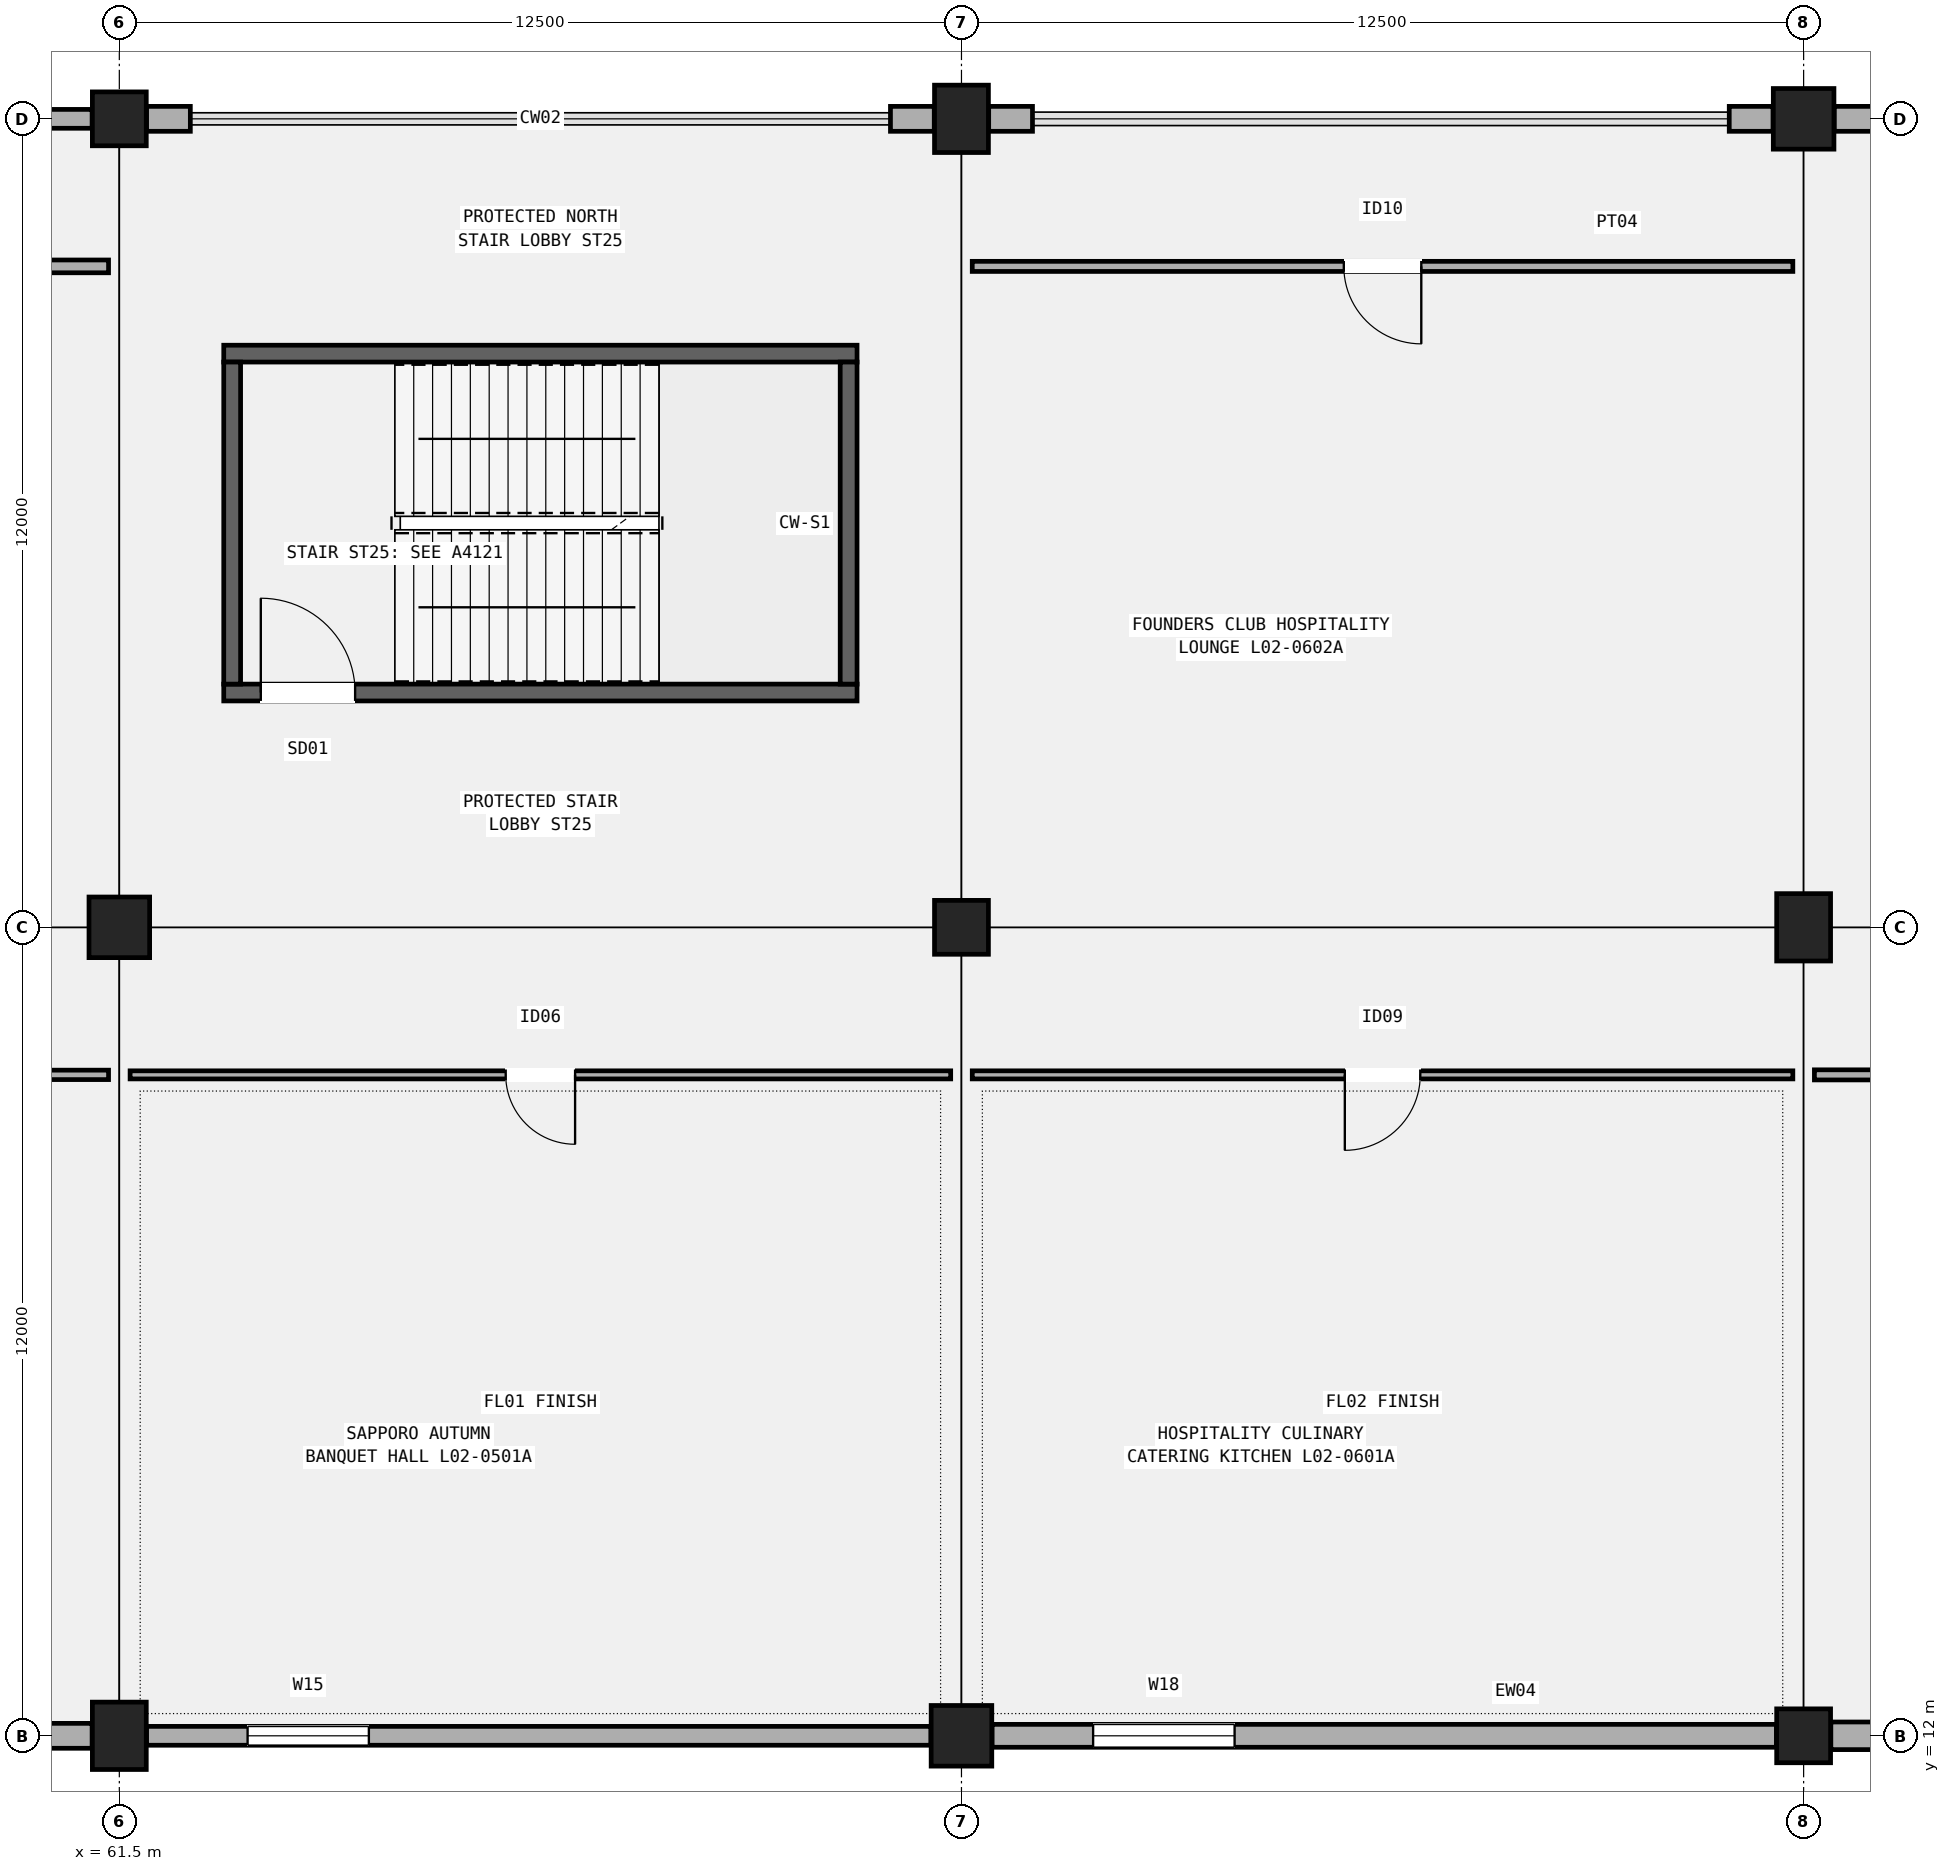
"""IFC4 building model, lengths in metres.
Left out: names, types, materials, properties, quantities, classifications, styles, units other than length and angle.
Written with IfcOpenShell. Run it as: python <this file> out.ifc"""

import sys

from ifc_helpers import new_model, si_unit, direction, frame, frame_2d, origin, origin_2d, place, context, subcontext, project, spatial, rectangle, extrude, element, fill, save


model = new_model("IFC4")
c1 = context("Model", 3, precision=1e-05, world=origin(), true_north=direction((0.0, 1.0)))
c2 = subcontext(c1, "Body", "Model", "MODEL_VIEW")
j1 = project(units=[si_unit("LENGTHUNIT", "METRE"), si_unit("PLANEANGLEUNIT", "RADIAN")], contexts=[c1])
p1 = place(None, origin())
s1 = spatial("IfcSite", under=j1, at=p1, CompositionType="ELEMENT")
p2 = place(p1, origin())
s2 = spatial("IfcBuilding", under=s1, at=p2, CompositionType="ELEMENT")
p3 = place(p2, frame((0.0, 0.0, 10.2)))
s3 = spatial("IfcBuildingStorey", under=s2, at=p3, CompositionType="ELEMENT", Elevation=10.2)
p4 = place(p3, frame((61.5, 12.0, 0.0), z_axis=(0.0, 0.0, 1.0), x_axis=(1.0, 0.0, 0.0)))
e1 = element("IfcColumn", 1, at=p4, inside=s3, PredefinedType="COLUMN", context=c2, shape_type="SweptSolid", body=[
    extrude(rectangle(XDim=0.8, YDim=1.0, at=origin_2d()), origin(), (0.0, 0.0, 1.0), 5.1),
])
p5 = place(p3, frame((61.5, 24.0, 0.0), z_axis=(0.0, 0.0, 1.0), x_axis=(1.0, 0.0, 0.0)))
e2 = element("IfcColumn", 2, at=p5, inside=s3, PredefinedType="COLUMN", context=c2, shape_type="SweptSolid", body=[
    extrude(rectangle(XDim=0.9, YDim=0.9, at=origin_2d()), origin(), (0.0, 0.0, 1.0), 5.1),
])
p6 = place(p3, frame((61.5, 36.0, 0.0), z_axis=(0.0, 0.0, 1.0), x_axis=(1.0, 0.0, 0.0)))
e3 = element("IfcColumn", 3, at=p6, inside=s3, PredefinedType="COLUMN", context=c2, shape_type="SweptSolid", body=[
    extrude(rectangle(XDim=0.8, YDim=0.8, at=origin_2d()), origin(), (0.0, 0.0, 1.0), 5.1),
])
p7 = place(p3, frame((74.0, 12.0, 0.0), z_axis=(0.0, 0.0, 1.0), x_axis=(1.0, 0.0, 0.0)))
e4 = element("IfcColumn", 4, at=p7, inside=s3, PredefinedType="COLUMN", context=c2, shape_type="SweptSolid", body=[
    extrude(rectangle(XDim=0.9, YDim=0.9, at=origin_2d()), origin(), (0.0, 0.0, 1.0), 5.1),
])
p8 = place(p3, frame((74.0, 24.0, 0.0), z_axis=(0.0, 0.0, 1.0), x_axis=(1.0, 0.0, 0.0)))
e5 = element("IfcColumn", 5, at=p8, inside=s3, PredefinedType="COLUMN", context=c2, shape_type="SweptSolid", body=[
    extrude(rectangle(XDim=0.8, YDim=0.8, at=origin_2d()), origin(), (0.0, 0.0, 1.0), 5.1),
])
p9 = place(p3, frame((74.0, 36.0, 0.0), z_axis=(0.0, 0.0, 1.0), x_axis=(1.0, 0.0, 0.0)))
e6 = element("IfcColumn", 6, at=p9, inside=s3, PredefinedType="COLUMN", context=c2, shape_type="SweptSolid", body=[
    extrude(rectangle(XDim=0.8, YDim=1.0, at=origin_2d()), origin(), (0.0, 0.0, 1.0), 5.1),
])
p10 = place(p3, frame((86.5, 12.0, 0.0), z_axis=(0.0, 0.0, 1.0), x_axis=(1.0, 0.0, 0.0)))
e7 = element("IfcColumn", 7, at=p10, inside=s3, PredefinedType="COLUMN", context=c2, shape_type="SweptSolid", body=[
    extrude(rectangle(XDim=0.8, YDim=0.8, at=origin_2d()), origin(), (0.0, 0.0, 1.0), 5.1),
])
p11 = place(p3, frame((86.5, 24.0, 0.0), z_axis=(0.0, 0.0, 1.0), x_axis=(1.0, 0.0, 0.0)))
e8 = element("IfcColumn", 8, at=p11, inside=s3, PredefinedType="COLUMN", context=c2, shape_type="SweptSolid", body=[
    extrude(rectangle(XDim=0.8, YDim=1.0, at=origin_2d()), origin(), (0.0, 0.0, 1.0), 5.1),
])
p12 = place(p3, frame((86.5, 36.0, 0.0), z_axis=(0.0, 0.0, 1.0), x_axis=(1.0, 0.0, 0.0)))
e9 = element("IfcColumn", 9, at=p12, inside=s3, PredefinedType="COLUMN", context=c2, shape_type="SweptSolid", body=[
    extrude(rectangle(XDim=0.9, YDim=0.9, at=origin_2d()), origin(), (0.0, 0.0, 1.0), 5.1),
])
p13 = place(p3, frame((60.446, 12.0, 0.0), z_axis=(0.0, 0.0, 1.0), x_axis=(1.0, 0.0, 0.0)))
e10 = element("IfcWall", 10, at=p13, inside=s3, PredefinedType="SOLIDWALL", context=c2, shape_type="SweptSolid", body=[
    extrude(rectangle(XDim=0.65, YDim=0.37, at=frame_2d((0.325, 0.0))), origin(), (0.0, 0.0, 1.0), 4.22),
])
p14 = place(p3, frame((49.454, 36.0, 0.0), z_axis=(0.0, 0.0, 1.0), x_axis=(1.0, 0.0, 0.0)))
e11 = element("IfcWall", 11, at=p14, inside=s3, PredefinedType="SOLIDWALL", context=c2, shape_type="SweptSolid", body=[
    extrude(rectangle(XDim=11.642, YDim=0.28, at=frame_2d((5.821, 0.0))), origin(), (0.0, 0.0, 1.0), 4.12),
])
p15 = place(p14, frame((1.5, 0.0, 0.95)))
e12 = element("IfcOpeningElement", 12, at=p15, cuts=e11, PredefinedType="OPENING", context=c2, shape_type="SweptSolid", body=[
    extrude(rectangle(XDim=1.65, YDim=2.45, at=frame_2d((0.825, 1.225))), frame((0.0, 0.15, 0.0), z_axis=(0.0, -1.0, 0.0), x_axis=(1.0, 0.0, 0.0)), (0.0, 0.0, 1.0), 0.3),
])
p16 = place(p3, frame((61.904, 12.0, 0.0), z_axis=(0.0, 0.0, 1.0), x_axis=(1.0, 0.0, 0.0)))
e13 = element("IfcWall", 13, at=p16, inside=s3, PredefinedType="SOLIDWALL", context=c2, shape_type="SweptSolid", body=[
    extrude(rectangle(XDim=11.642, YDim=0.28, at=frame_2d((5.821, 0.0))), origin(), (0.0, 0.0, 1.0), 4.02),
])
p17 = place(p16, frame((1.5, 0.0, 0.95)))
e14 = element("IfcOpeningElement", 14, at=p17, cuts=e13, PredefinedType="OPENING", context=c2, shape_type="SweptSolid", body=[
    extrude(rectangle(XDim=1.8, YDim=2.55, at=frame_2d((0.9, 1.275))), frame((0.0, 0.15, 0.0), z_axis=(0.0, -1.0, 0.0), x_axis=(1.0, 0.0, 0.0)), (0.0, 0.0, 1.0), 0.3),
])
for number, where, z_axis, x_axis in (
    (15, (61.904, 36.0, 0.0), (0.0, 0.0, 1.0), (1.0, 0.0, 0.0)),
    (16, (72.946, 36.0, 0.0), (0.0, 0.0, 1.0), (1.0, 0.0, 0.0)),
):
    element("IfcWall", number, at=place(p3, frame(where, z_axis=z_axis, x_axis=x_axis)), inside=s3, PredefinedType="SOLIDWALL", context=c2, shape_type="SweptSolid", body=[
        extrude(rectangle(XDim=0.65, YDim=0.37, at=frame_2d((0.325, 0.0))), origin(), (0.0, 0.0, 1.0), 4.22),
    ])
p18 = place(p3, frame((74.454, 12.0, 0.0), z_axis=(0.0, 0.0, 1.0), x_axis=(1.0, 0.0, 0.0)))
e17 = element("IfcWall", 17, at=p18, inside=s3, PredefinedType="SOLIDWALL", context=c2, shape_type="SweptSolid", body=[
    extrude(rectangle(XDim=11.642, YDim=0.34, at=frame_2d((5.821, 0.0))), origin(), (0.0, 0.0, 1.0), 4.12),
])
p19 = place(p18, frame((1.5, 0.0, 0.95)))
e18 = element("IfcOpeningElement", 18, at=p19, cuts=e17, PredefinedType="OPENING", context=c2, shape_type="SweptSolid", body=[
    extrude(rectangle(XDim=2.1, YDim=1.85, at=frame_2d((1.05, 0.925))), frame((0.0, 0.18, 0.0), z_axis=(0.0, -1.0, 0.0), x_axis=(1.0, 0.0, 0.0)), (0.0, 0.0, 1.0), 0.36),
])
for number, where, z_axis, x_axis in (
    (19, (74.404, 36.0, 0.0), (0.0, 0.0, 1.0), (1.0, 0.0, 0.0)),
    (20, (85.396, 36.0, 0.0), (0.0, 0.0, 1.0), (1.0, 0.0, 0.0)),
):
    element("IfcWall", number, at=place(p3, frame(where, z_axis=z_axis, x_axis=x_axis)), inside=s3, PredefinedType="SOLIDWALL", context=c2, shape_type="SweptSolid", body=[
        extrude(rectangle(XDim=0.65, YDim=0.37, at=frame_2d((0.325, 0.0))), origin(), (0.0, 0.0, 1.0), 4.02),
    ])
p20 = place(p3, frame((86.904, 12.0, 0.0), z_axis=(0.0, 0.0, 1.0), x_axis=(1.0, 0.0, 0.0)))
e21 = element("IfcWall", 21, at=p20, inside=s3, PredefinedType="SOLIDWALL", context=c2, shape_type="SweptSolid", body=[
    extrude(rectangle(XDim=11.692, YDim=0.41, at=frame_2d((5.846, 0.0))), origin(), (0.0, 0.0, 1.0), 4.22),
])
p21 = place(p20, frame((1.5, 0.0, 0.95)))
e22 = element("IfcOpeningElement", 22, at=p21, cuts=e21, PredefinedType="OPENING", context=c2, shape_type="SweptSolid", body=[
    extrude(rectangle(XDim=2.1, YDim=2.6, at=frame_2d((1.05, 1.3))), frame((0.0, 0.215, 0.0), z_axis=(0.0, -1.0, 0.0), x_axis=(1.0, 0.0, 0.0)), (0.0, 0.0, 1.0), 0.43),
])
p22 = place(p3, frame((86.954, 36.0, 0.0), z_axis=(0.0, 0.0, 1.0), x_axis=(1.0, 0.0, 0.0)))
e23 = element("IfcWall", 23, at=p22, inside=s3, PredefinedType="SOLIDWALL", context=c2, shape_type="SweptSolid", body=[
    extrude(rectangle(XDim=0.65, YDim=0.37, at=frame_2d((0.325, 0.0))), origin(), (0.0, 0.0, 1.0), 4.12),
])
p23 = place(p3, frame((63.05, 27.485, 0.0), z_axis=(0.0, 0.0, 1.0), x_axis=(1.0, 0.0, 0.0)))
e24 = element("IfcWall", 24, at=p23, inside=s3, PredefinedType="SHEAR", context=c2, shape_type="SweptSolid", body=[
    extrude(rectangle(XDim=9.4, YDim=0.25, at=frame_2d((4.7, 0.0))), origin(), (0.0, 0.0, 1.0), 4.82),
])
p24 = place(p23, frame((0.55, 0.0, 0.0)))
e25 = element("IfcOpeningElement", 25, at=p24, cuts=e24, PredefinedType="OPENING", context=c2, shape_type="SweptSolid", body=[
    extrude(rectangle(XDim=1.4, YDim=2.15, at=frame_2d((0.7, 1.075))), frame((0.0, 0.135, 0.0), z_axis=(0.0, -1.0, 0.0), x_axis=(1.0, 0.0, 0.0)), (0.0, 0.0, 1.0), 0.27),
])
p25 = place(p3, frame((63.05, 32.515, 0.0), z_axis=(0.0, 0.0, 1.0), x_axis=(1.0, 0.0, 0.0)))
e26 = element("IfcWall", 26, at=p25, inside=s3, PredefinedType="SHEAR", context=c2, shape_type="SweptSolid", body=[
    extrude(rectangle(XDim=9.4, YDim=0.25, at=frame_2d((4.7, 0.0))), origin(), (0.0, 0.0, 1.0), 4.82),
])
for number, where, z_axis, x_axis in (
    (27, (63.175, 27.61, 0.0), (0.0, 0.0, 1.0), (0.0, 1.0, 0.0)),
    (28, (72.325, 27.61, 0.0), (0.0, 0.0, 1.0), (0.0, 1.0, 0.0)),
):
    element("IfcWall", number, at=place(p3, frame(where, z_axis=z_axis, x_axis=x_axis)), inside=s3, PredefinedType="SHEAR", context=c2, shape_type="SweptSolid", body=[
        extrude(rectangle(XDim=4.78, YDim=0.25, at=frame_2d((2.39, 0.0))), origin(), (0.0, 0.0, 1.0), 4.82),
    ])
p26 = place(p3, frame((51.12, 21.81, 0.0), z_axis=(0.0, 0.0, 1.0), x_axis=(1.0, 0.0, 0.0)))
e29 = element("IfcWall", 29, at=p26, inside=s3, PredefinedType="PARTITIONING", context=c2, shape_type="SweptSolid", body=[
    extrude(rectangle(XDim=10.22, YDim=0.14, at=frame_2d((5.11, 0.0))), origin(), (0.0, 0.0, 1.0), 4.22),
])
p27 = place(p26, frame((5.57, 0.0, 0.0), z_axis=(0.0, 0.0, 1.0), x_axis=(-1.0, 0.0, 0.0)))
e30 = element("IfcOpeningElement", 30, at=p27, cuts=e29, PredefinedType="OPENING", context=c2, shape_type="SweptSolid", body=[
    extrude(rectangle(XDim=0.92, YDim=2.1, at=frame_2d((0.46, 1.05))), frame((0.0, 0.08, 0.0), z_axis=(0.0, -1.0, 0.0), x_axis=(1.0, 0.0, 0.0)), (0.0, 0.0, 1.0), 0.16),
])
p28 = place(p3, frame((51.12, 33.81, 0.0), z_axis=(0.0, 0.0, 1.0), x_axis=(1.0, 0.0, 0.0)))
e31 = element("IfcWall", 31, at=p28, inside=s3, PredefinedType="PARTITIONING", context=c2, shape_type="SweptSolid", body=[
    extrude(rectangle(XDim=10.22, YDim=0.19, at=frame_2d((5.11, 0.0))), origin(), (0.0, 0.0, 1.0), 4.22),
])
p29 = place(p28, frame((5.585, 0.0, 0.0), z_axis=(0.0, 0.0, 1.0), x_axis=(-1.0, 0.0, 0.0)))
e32 = element("IfcOpeningElement", 32, at=p29, cuts=e31, PredefinedType="OPENING", context=c2, shape_type="SweptSolid", body=[
    extrude(rectangle(XDim=0.95, YDim=2.12, at=frame_2d((0.475, 1.06))), frame((0.0, 0.105, 0.0), z_axis=(0.0, -1.0, 0.0), x_axis=(1.0, 0.0, 0.0)), (0.0, 0.0, 1.0), 0.21),
])
p30 = place(p3, frame((61.66, 21.81, 0.0), z_axis=(0.0, 0.0, 1.0), x_axis=(1.0, 0.0, 0.0)))
e33 = element("IfcWall", 33, at=p30, inside=s3, PredefinedType="PARTITIONING", context=c2, shape_type="SweptSolid", body=[
    extrude(rectangle(XDim=12.18, YDim=0.12, at=frame_2d((6.09, 0.0))), origin(), (0.0, 0.0, 1.0), 4.22),
])
p31 = place(p30, frame((6.605, 0.0, 0.0), z_axis=(0.0, 0.0, 1.0), x_axis=(-1.0, 0.0, 0.0)))
e34 = element("IfcOpeningElement", 34, at=p31, cuts=e33, PredefinedType="OPENING", context=c2, shape_type="SweptSolid", body=[
    extrude(rectangle(XDim=1.03, YDim=2.12, at=frame_2d((0.515, 1.06))), frame((0.0, 0.07, 0.0), z_axis=(0.0, -1.0, 0.0), x_axis=(1.0, 0.0, 0.0)), (0.0, 0.0, 1.0), 0.14),
])
p32 = place(p3, frame((74.16, 21.81, 0.0), z_axis=(0.0, 0.0, 1.0), x_axis=(1.0, 0.0, 0.0)))
e35 = element("IfcWall", 35, at=p32, inside=s3, PredefinedType="PARTITIONING", context=c2, shape_type="SweptSolid", body=[
    extrude(rectangle(XDim=12.18, YDim=0.12, at=frame_2d((6.09, 0.0))), origin(), (0.0, 0.0, 1.0), 4.22),
])
p33 = place(p32, frame((6.65, 0.0, 0.0), z_axis=(0.0, 0.0, 1.0), x_axis=(-1.0, 0.0, 0.0)))
e36 = element("IfcOpeningElement", 36, at=p33, cuts=e35, PredefinedType="OPENING", context=c2, shape_type="SweptSolid", body=[
    extrude(rectangle(XDim=1.12, YDim=2.18, at=frame_2d((0.56, 1.09))), frame((0.0, 0.07, 0.0), z_axis=(0.0, -1.0, 0.0), x_axis=(1.0, 0.0, 0.0)), (0.0, 0.0, 1.0), 0.14),
])
p34 = place(p3, frame((74.16, 33.81, 0.0), z_axis=(0.0, 0.0, 1.0), x_axis=(1.0, 0.0, 0.0)))
e37 = element("IfcWall", 37, at=p34, inside=s3, PredefinedType="PARTITIONING", context=c2, shape_type="SweptSolid", body=[
    extrude(rectangle(XDim=12.18, YDim=0.15, at=frame_2d((6.09, 0.0))), origin(), (0.0, 0.0, 1.0), 4.22),
])
p35 = place(p34, frame((6.665, 0.0, 0.0), z_axis=(0.0, 0.0, 1.0), x_axis=(-1.0, 0.0, 0.0)))
e38 = element("IfcOpeningElement", 38, at=p35, cuts=e37, PredefinedType="OPENING", context=c2, shape_type="SweptSolid", body=[
    extrude(rectangle(XDim=1.15, YDim=2.15, at=frame_2d((0.575, 1.075))), frame((0.0, 0.085, 0.0), z_axis=(0.0, -1.0, 0.0), x_axis=(1.0, 0.0, 0.0)), (0.0, 0.0, 1.0), 0.17),
])
p36 = place(p3, frame((86.66, 21.81, 0.0), z_axis=(0.0, 0.0, 1.0), x_axis=(1.0, 0.0, 0.0)))
e39 = element("IfcWall", 39, at=p36, inside=s3, PredefinedType="PARTITIONING", context=c2, shape_type="SweptSolid", body=[
    extrude(rectangle(XDim=12.18, YDim=0.15, at=frame_2d((6.09, 0.0))), origin(), (0.0, 0.0, 1.0), 4.22),
])
p37 = place(p36, frame((6.71, 0.0, 0.0), z_axis=(0.0, 0.0, 1.0), x_axis=(-1.0, 0.0, 0.0)))
e40 = element("IfcOpeningElement", 40, at=p37, cuts=e39, PredefinedType="OPENING", context=c2, shape_type="SweptSolid", body=[
    extrude(rectangle(XDim=1.24, YDim=2.22, at=frame_2d((0.62, 1.11))), frame((0.0, 0.085, 0.0), z_axis=(0.0, -1.0, 0.0), x_axis=(1.0, 0.0, 0.0)), (0.0, 0.0, 1.0), 0.17),
])
p38 = place(p17, origin())
e41 = element("IfcWindow", 41, at=p38, inside=s3, PartitioningType="SINGLE_PANEL", PredefinedType="WINDOW", context=c2, shape_type="SweptSolid", body=[
    extrude(rectangle(XDim=1.8, YDim=2.55, at=frame_2d((0.9, 1.275))), frame((0.0, 0.03, 0.0), z_axis=(0.0, -1.0, 0.0), x_axis=(1.0, 0.0, 0.0)), (0.0, 0.0, 1.0), 0.06),
])
fill(e14, e41)
p39 = place(p19, origin())
e42 = element("IfcWindow", 42, at=p39, inside=s3, PartitioningType="SINGLE_PANEL", PredefinedType="WINDOW", context=c2, shape_type="SweptSolid", body=[
    extrude(rectangle(XDim=2.1, YDim=1.85, at=frame_2d((1.05, 0.925))), frame((0.0, 0.03, 0.0), z_axis=(0.0, -1.0, 0.0), x_axis=(1.0, 0.0, 0.0)), (0.0, 0.0, 1.0), 0.06),
])
fill(e18, e42)
p40 = place(p24, origin())
e43 = element("IfcDoor", 43, at=p40, inside=s3, OperationType="SINGLE_SWING_LEFT", PredefinedType="DOOR", context=c2, shape_type="SweptSolid", body=[
    extrude(rectangle(XDim=1.4, YDim=2.15, at=frame_2d((0.7, 1.075))), frame((0.0, 0.025, 0.0), z_axis=(0.0, -1.0, 0.0), x_axis=(1.0, 0.0, 0.0)), (0.0, 0.0, 1.0), 0.05),
])
fill(e25, e43)
p41 = place(p31, origin())
e44 = element("IfcDoor", 44, at=p41, inside=s3, OperationType="SINGLE_SWING_LEFT", PredefinedType="DOOR", context=c2, shape_type="SweptSolid", body=[
    extrude(rectangle(XDim=1.03, YDim=2.12, at=frame_2d((0.515, 1.06))), frame((0.0, 0.025, 0.0), z_axis=(0.0, -1.0, 0.0), x_axis=(1.0, 0.0, 0.0)), (0.0, 0.0, 1.0), 0.05),
])
fill(e34, e44)
p42 = place(p33, origin())
e45 = element("IfcDoor", 45, at=p42, inside=s3, OperationType="SINGLE_SWING_RIGHT", PredefinedType="DOOR", context=c2, shape_type="SweptSolid", body=[
    extrude(rectangle(XDim=1.12, YDim=2.18, at=frame_2d((0.56, 1.09))), frame((0.0, 0.025, 0.0), z_axis=(0.0, -1.0, 0.0), x_axis=(1.0, 0.0, 0.0)), (0.0, 0.0, 1.0), 0.05),
])
fill(e36, e45)
p43 = place(p35, origin())
e46 = element("IfcDoor", 46, at=p43, inside=s3, OperationType="SINGLE_SWING_LEFT", PredefinedType="DOOR", context=c2, shape_type="SweptSolid", body=[
    extrude(rectangle(XDim=1.15, YDim=2.15, at=frame_2d((0.575, 1.075))), frame((0.0, 0.025, 0.0), z_axis=(0.0, -1.0, 0.0), x_axis=(1.0, 0.0, 0.0)), (0.0, 0.0, 1.0), 0.05),
])
fill(e38, e46)
save(model, sys.argv[1])
